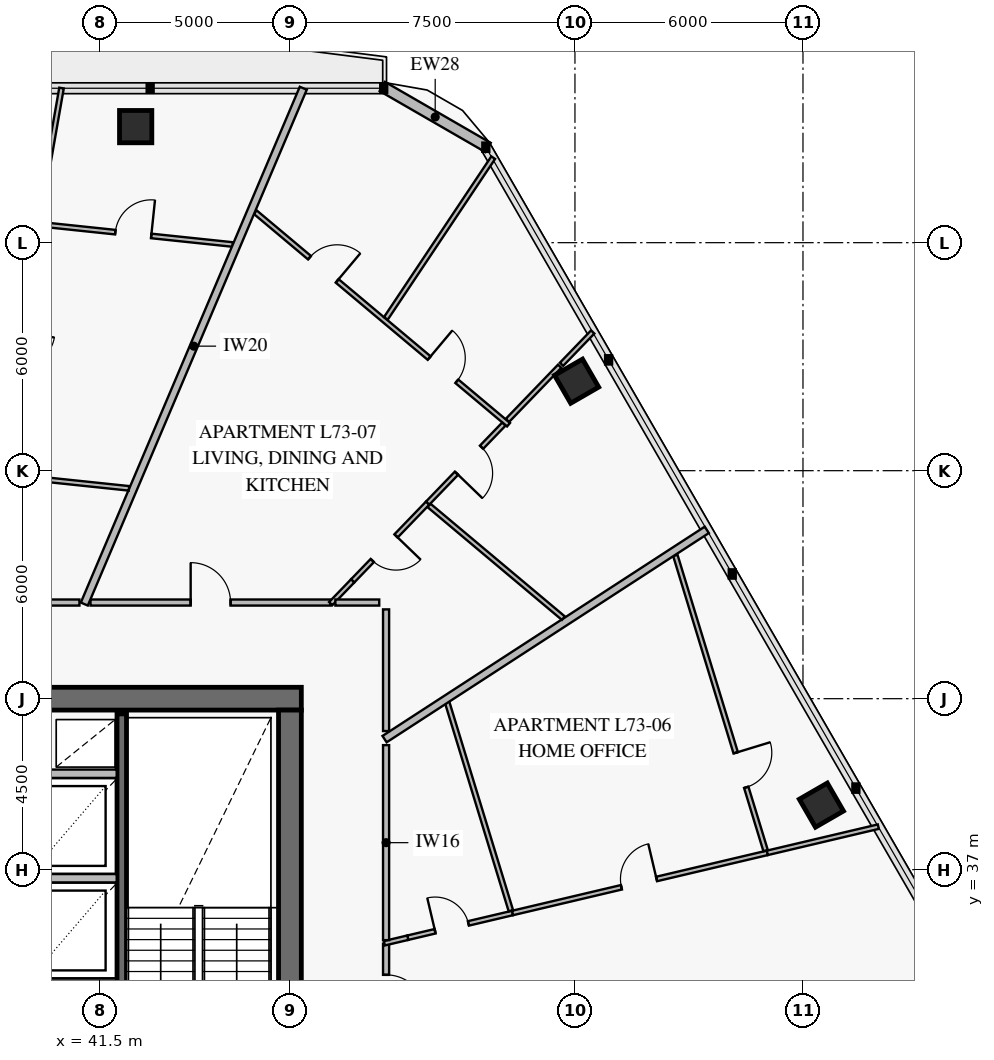
"""IFC4 building model, lengths in metres.
Left out: names, types, materials, properties, quantities, classifications, styles, units other than length and angle.
Written with IfcOpenShell. Run it as: python <this file> out.ifc"""

import sys

from ifc_helpers import new_model, si_unit, direction, frame, frame_2d, origin, origin_2d, place, context, subcontext, project, spatial, rectangle, extrude, element, fill, save


model = new_model("IFC4")
c1 = context("Model", 3, precision=1e-05, world=origin(), true_north=direction((0.0, 1.0)))
c2 = subcontext(c1, "Body", "Model", "MODEL_VIEW")
j1 = project(units=[si_unit("LENGTHUNIT", "METRE"), si_unit("PLANEANGLEUNIT", "RADIAN")], contexts=[c1])
p1 = place(None, origin())
s1 = spatial("IfcSite", under=j1, at=p1, CompositionType="ELEMENT")
p2 = place(p1, origin())
s2 = spatial("IfcBuilding", under=s1, at=p2, CompositionType="ELEMENT")
p3 = place(p2, frame((0.0, 0.0, 288.2)))
s3 = spatial("IfcBuildingStorey", under=s2, at=p3, CompositionType="ELEMENT", Elevation=288.2)
p4 = place(p3, frame((46.8, 41.5, 0.0), z_axis=(0.0, 0.0, 1.0), x_axis=(-1.0, 0.0, 0.0)))
e1 = element("IfcWall", 1, at=p4, inside=s3, PredefinedType="SHEAR", context=c2, shape_type="SweptSolid", body=[
    extrude(rectangle(XDim=7.85, YDim=0.6, at=frame_2d((3.925, 0.0))), origin(), (0.0, 0.0, 1.0), 3.8),
])
p5 = place(p3, frame((46.5, 22.8, 0.0), z_axis=(0.0, 0.0, 1.0), x_axis=(0.0, 1.0, 0.0)))
e2 = element("IfcWall", 2, at=p5, inside=s3, PredefinedType="SHEAR", context=c2, shape_type="SweptSolid", body=[
    extrude(rectangle(XDim=18.4, YDim=0.6, at=frame_2d((9.2, 0.0))), origin(), (0.0, 0.0, 1.0), 3.8),
])
p6 = place(p5, frame((8.95, 0.0, 0.0)))
e3 = element("IfcOpeningElement", 3, at=p6, cuts=e2, PredefinedType="OPENING", context=c2, shape_type="SweptSolid", body=[
    extrude(rectangle(XDim=1.1, YDim=2.15, at=frame_2d((0.55, 1.075))), frame((0.0, 0.312, 0.0), z_axis=(0.0, -1.0, 0.0), x_axis=(1.0, 0.0, 0.0)), (0.0, 0.0, 1.0), 0.624),
])
for number, where, z_axis, x_axis in (
    (4, (60.485, 38.699, 0.0), (0.0, 0.0, 1.0), (-0.5, 0.866, 0.0)),
    (5, (54.044, 49.855, 0.0), (0.0, 0.0, 1.0), (-0.5, 0.866, 0.0)),
    (6, (42.441, 56.554, 0.0), (0.0, 0.0, 1.0), (-1.0, 0.0, 0.0)),
):
    element("IfcColumn", number, at=place(p3, frame(where, z_axis=z_axis, x_axis=x_axis)), inside=s3, PredefinedType="COLUMN", context=c2, shape_type="SweptSolid", body=[
        extrude(rectangle(XDim=0.85, YDim=0.85, at=origin_2d()), origin(), (0.0, 0.0, 1.0), 3.55),
    ])
p7 = place(p3, frame((48.93, 57.611, 0.0), z_axis=(0.0, 0.0, 1.0), x_axis=(0.866028773314, -0.499994163758, 0.0)))
e7 = element("IfcWall", 7, at=p7, inside=s3, PredefinedType="SOLIDWALL", context=c2, shape_type="SweptSolid", body=[
    extrude(rectangle(XDim=3.215, YDim=0.28, at=frame_2d((1.607, 0.0))), origin(), (0.0, 0.0, 1.0), 3.55),
])
p8 = place(p3, frame((42.075, 31.4, 0.0), z_axis=(0.0, 0.0, 1.0), x_axis=(0.0, 1.0, 0.0)))
e8 = element("IfcWall", 8, at=p8, inside=s3, PredefinedType="SOLIDWALL", context=c2, shape_type="SweptSolid", body=[
    extrude(rectangle(XDim=9.7, YDim=0.25, at=frame_2d((4.85, 0.0))), origin(), (0.0, 0.0, 1.0), 3.8),
])
p9 = place(p3, frame((49.6, 35.21, 0.0), z_axis=(0.0, 0.0, 1.0), x_axis=(0.973261007636, 0.229702004812, 0.0)))
e9 = element("IfcWall", 9, at=p9, inside=s3, PredefinedType="PARTITIONING", context=c2, shape_type="SweptSolid", body=[
    extrude(rectangle(XDim=2.833, YDim=0.12, at=frame_2d((1.417, 0.0))), origin(), (0.0, 0.0, 1.0), 3.55),
])
p10 = place(p9, frame((0.74, 0.0, 0.0)))
e10 = element("IfcOpeningElement", 10, at=p10, cuts=e9, PredefinedType="OPENING", context=c2, shape_type="SweptSolid", body=[
    extrude(rectangle(XDim=0.9, YDim=2.1, at=frame_2d((0.45, 1.05))), frame((0.0, 0.072, 0.0), z_axis=(0.0, -1.0, 0.0), x_axis=(1.0, 0.0, 0.0)), (0.0, 0.0, 1.0), 0.144),
])
p11 = place(p3, frame((52.358, 35.861, 0.0), z_axis=(0.0, 0.0, 1.0), x_axis=(0.973258867779, 0.229711071324, 0.0)))
e11 = element("IfcWall", 11, at=p11, inside=s3, PredefinedType="PARTITIONING", context=c2, shape_type="SweptSolid", body=[
    extrude(rectangle(XDim=6.887, YDim=0.12, at=frame_2d((3.443, 0.0))), origin(), (0.0, 0.0, 1.0), 3.55),
])
p12 = place(p11, frame((2.944, 0.0, 0.0)))
e12 = element("IfcOpeningElement", 12, at=p12, cuts=e11, PredefinedType="OPENING", context=c2, shape_type="SweptSolid", body=[
    extrude(rectangle(XDim=0.95, YDim=2.1, at=frame_2d((0.475, 1.05))), frame((0.0, 0.072, 0.0), z_axis=(0.0, -1.0, 0.0), x_axis=(1.0, 0.0, 0.0)), (0.0, 0.0, 1.0), 0.144),
])
p13 = place(p3, frame((59.017, 37.502, 0.0), z_axis=(0.0, 0.0, 1.0), x_axis=(-0.292365927027, 0.956306522363, 0.0)))
e13 = element("IfcWall", 13, at=p13, inside=s3, PredefinedType="PARTITIONING", context=c2, shape_type="SweptSolid", body=[
    extrude(rectangle(XDim=8.122, YDim=0.12, at=frame_2d((4.061, 0.0))), origin(), (0.0, 0.0, 1.0), 2.93),
])
p14 = place(p13, frame((1.742, 0.0, 0.0)))
e14 = element("IfcOpeningElement", 14, at=p14, cuts=e13, PredefinedType="OPENING", context=c2, shape_type="SweptSolid", body=[
    extrude(rectangle(XDim=0.95, YDim=2.1, at=frame_2d((0.475, 1.05))), frame((0.0, 0.072, 0.0), z_axis=(0.0, -1.0, 0.0), x_axis=(1.0, 0.0, 0.0)), (0.0, 0.0, 1.0), 0.144),
])
p15 = place(p3, frame((49.03, 32.361, 0.0), z_axis=(0.0, 0.0, 1.0), x_axis=(0.0, 1.0, 0.0)))
e15 = element("IfcWall", 15, at=p15, inside=s3, PredefinedType="PARTITIONING", context=c2, shape_type="SweptSolid", body=[
    extrude(rectangle(XDim=2.694, YDim=0.16, at=frame_2d((1.347, 0.0))), origin(), (0.0, 0.0, 1.0), 3.55),
])
p16 = place(p15, frame((0.822, 0.0, 0.0)))
e16 = element("IfcOpeningElement", 16, at=p16, cuts=e15, PredefinedType="OPENING", context=c2, shape_type="SweptSolid", body=[
    extrude(rectangle(XDim=1.05, YDim=2.15, at=frame_2d((0.525, 1.075))), frame((0.0, 0.092, 0.0), z_axis=(0.0, -1.0, 0.0), x_axis=(1.0, 0.0, 0.0)), (0.0, 0.0, 1.0), 0.184),
])
p17 = place(p3, frame((52.253, 48.71, 0.0), z_axis=(0.0, 0.0, 1.0), x_axis=(-0.766038651281, 0.642794512067, 0.0)))
e17 = element("IfcWall", 17, at=p17, inside=s3, PredefinedType="PARTITIONING", context=c2, shape_type="SweptSolid", body=[
    extrude(rectangle(XDim=8.7, YDim=0.12, at=frame_2d((4.35, 0.0))), origin(), (0.0, 0.0, 1.0), 3.55),
])
p18 = place(p17, frame((1.778, 0.0, 0.0)))
e18 = element("IfcOpeningElement", 18, at=p18, cuts=e17, PredefinedType="OPENING", context=c2, shape_type="SweptSolid", body=[
    extrude(rectangle(XDim=0.95, YDim=2.1, at=frame_2d((0.475, 1.05))), frame((0.0, 0.072, 0.0), z_axis=(0.0, -1.0, 0.0), x_axis=(1.0, 0.0, 0.0)), (0.0, 0.0, 1.0), 0.144),
])
p19 = place(p17, frame((5.887, 0.0, 0.0)))
e19 = element("IfcOpeningElement", 19, at=p19, cuts=e17, PredefinedType="OPENING", context=c2, shape_type="SweptSolid", body=[
    extrude(rectangle(XDim=0.95, YDim=2.1, at=frame_2d((0.475, 1.05))), frame((0.0, 0.072, 0.0), z_axis=(0.0, -1.0, 0.0), x_axis=(1.0, 0.0, 0.0)), (0.0, 0.0, 1.0), 0.144),
])
p20 = place(p3, frame((48.151, 44.6, 0.0), z_axis=(0.0, 0.0, 1.0), x_axis=(0.694200700665, 0.719781485727, 0.0)))
e20 = element("IfcWall", 20, at=p20, inside=s3, PredefinedType="PARTITIONING", context=c2, shape_type="SweptSolid", body=[
    extrude(rectangle(XDim=2.844, YDim=0.12, at=frame_2d((1.422, 0.0))), origin(), (0.0, 0.0, 1.0), 3.55),
])
p21 = place(p20, frame((0.745, 0.0, 0.0)))
e21 = element("IfcOpeningElement", 21, at=p21, cuts=e20, PredefinedType="OPENING", context=c2, shape_type="SweptSolid", body=[
    extrude(rectangle(XDim=0.9, YDim=2.1, at=frame_2d((0.45, 1.05))), frame((0.0, 0.072, 0.0), z_axis=(0.0, -1.0, 0.0), x_axis=(1.0, 0.0, 0.0)), (0.0, 0.0, 1.0), 0.144),
])
p22 = place(p3, frame((50.125, 46.647, 0.0), z_axis=(0.0, 0.0, 1.0), x_axis=(0.6941778281, 0.719803544708, 0.0)))
e22 = element("IfcWall", 22, at=p22, inside=s3, PredefinedType="PARTITIONING", context=c2, shape_type="SweptSolid", body=[
    extrude(rectangle(XDim=2.887, YDim=0.12, at=frame_2d((1.443, 0.0))), origin(), (0.0, 0.0, 1.0), 3.55),
])
p23 = place(p22, frame((1.092, 0.0, 0.0)))
e23 = element("IfcOpeningElement", 23, at=p23, cuts=e22, PredefinedType="OPENING", context=c2, shape_type="SweptSolid", body=[
    extrude(rectangle(XDim=0.95, YDim=2.1, at=frame_2d((0.475, 1.05))), frame((0.0, 0.072, 0.0), z_axis=(0.0, -1.0, 0.0), x_axis=(1.0, 0.0, 0.0)), (0.0, 0.0, 1.0), 0.144),
])
p24 = place(p3, frame((52.223, 48.823, 0.0), z_axis=(0.0, 0.0, 1.0), x_axis=(0.694112766322, 0.719866284547, 0.0)))
e24 = element("IfcWall", 24, at=p24, inside=s3, PredefinedType="PARTITIONING", context=c2, shape_type="SweptSolid", body=[
    extrude(rectangle(XDim=1.981, YDim=0.12, at=frame_2d((0.991, 0.0))), origin(), (0.0, 0.0, 1.0), 2.93),
])
p25 = place(p3, frame((47.573, 44.03, 0.0), z_axis=(0.0, 0.0, 1.0), x_axis=(-1.0, 0.0, 0.0)))
e25 = element("IfcWall", 25, at=p25, inside=s3, PredefinedType="PARTITIONING", context=c2, shape_type="SweptSolid", body=[
    extrude(rectangle(XDim=6.321, YDim=0.16, at=frame_2d((3.16, 0.0))), origin(), (0.0, 0.0, 1.0), 3.55),
])
p26 = place(p25, frame((2.635, 0.0, 0.0)))
e26 = element("IfcOpeningElement", 26, at=p26, cuts=e25, PredefinedType="OPENING", context=c2, shape_type="SweptSolid", body=[
    extrude(rectangle(XDim=1.05, YDim=2.15, at=frame_2d((0.525, 1.075))), frame((0.0, 0.092, 0.0), z_axis=(0.0, -1.0, 0.0), x_axis=(1.0, 0.0, 0.0)), (0.0, 0.0, 1.0), 0.184),
])
p27 = place(p3, frame((44.994, 53.452, 0.0), z_axis=(0.0, 0.0, 1.0), x_axis=(-0.994522778287, 0.104520062511, 0.0)))
e27 = element("IfcWall", 27, at=p27, inside=s3, PredefinedType="PARTITIONING", context=c2, shape_type="SweptSolid", body=[
    extrude(rectangle(XDim=5.092, YDim=0.12, at=frame_2d((2.546, 0.0))), origin(), (0.0, 0.0, 1.0), 2.95),
])
p28 = place(p27, frame((2.155, 0.0, 0.0)))
e28 = element("IfcOpeningElement", 28, at=p28, cuts=e27, PredefinedType="OPENING", context=c2, shape_type="SweptSolid", body=[
    extrude(rectangle(XDim=0.95, YDim=2.1, at=frame_2d((0.475, 1.05))), frame((0.0, 0.072, 0.0), z_axis=(0.0, -1.0, 0.0), x_axis=(1.0, 0.0, 0.0)), (0.0, 0.0, 1.0), 0.144),
])
for number, where, z_axis, x_axis in (
    (29, (39.558, 34.025, 0.0), (0.0, 0.0, 1.0), (1.0, 0.0, 0.0)),
    (30, (39.558, 36.775, 0.0), (0.0, 0.0, 1.0), (1.0, 0.0, 0.0)),
    (31, (39.558, 39.525, 0.0), (0.0, 0.0, 1.0), (1.0, 0.0, 0.0)),
):
    element("IfcWall", number, at=place(p3, frame(where, z_axis=z_axis, x_axis=x_axis)), inside=s3, PredefinedType="PARTITIONING", context=c2, shape_type="SweptSolid", body=[
        extrude(rectangle(XDim=2.384, YDim=0.22, at=frame_2d((1.192, 0.0))), origin(), (0.0, 0.0, 1.0), 3.55),
    ])
p29 = place(p3, frame((48.986, 35.065, 0.0), z_axis=(0.0, 0.0, 1.0), x_axis=(0.973264818569, 0.229685857064, 0.0)))
e32 = element("IfcWall", 32, at=p29, inside=s3, PredefinedType="PARTITIONING", context=c2, shape_type="SweptSolid", body=[
    extrude(rectangle(XDim=0.631, YDim=0.12, at=frame_2d((0.316, 0.0))), origin(), (0.0, 0.0, 1.0), 3.55),
])
p30 = place(p3, frame((59.061, 37.443, 0.0), z_axis=(0.0, 0.0, 1.0), x_axis=(0.97326763554, 0.229673920178, 0.0)))
e33 = element("IfcWall", 33, at=p30, inside=s3, PredefinedType="PARTITIONING", context=c2, shape_type="SweptSolid", body=[
    extrude(rectangle(XDim=3.002, YDim=0.12, at=frame_2d((1.501, 0.0))), origin(), (0.0, 0.0, 1.0), 2.93),
])
p31 = place(p3, frame((52.314, 35.92, 0.0), z_axis=(0.0, 0.0, 1.0), x_axis=(-0.292348629737, 0.95631181039, 0.0)))
e34 = element("IfcWall", 34, at=p31, inside=s3, PredefinedType="PARTITIONING", context=c2, shape_type="SweptSolid", body=[
    extrude(rectangle(XDim=5.769, YDim=0.12, at=frame_2d((2.884, 0.0))), origin(), (0.0, 0.0, 1.0), 2.95),
])
p32 = place(p3, frame((48.99, 40.436, 0.0), z_axis=(0.0, 0.0, 1.0), x_axis=(0.838669748525, 0.54464029681, 0.0)))
e35 = element("IfcWall", 35, at=p32, inside=s3, PredefinedType="PARTITIONING", context=c2, shape_type="SweptSolid", body=[
    extrude(rectangle(XDim=10.11, YDim=0.2, at=frame_2d((5.055, 0.0))), origin(), (0.0, 0.0, 1.0), 2.93),
])
p33 = place(p3, frame((49.025, 51.507, 0.0), z_axis=(0.0, 0.0, 1.0), x_axis=(0.555254005254, 0.83168082198, 0.0)))
e36 = element("IfcWall", 36, at=p33, inside=s3, PredefinedType="PARTITIONING", context=c2, shape_type="SweptSolid", body=[
    extrude(rectangle(XDim=5.085, YDim=0.12, at=frame_2d((2.543, 0.0))), origin(), (0.0, 0.0, 1.0), 2.93),
])
p34 = place(p3, frame((47.573, 44.001, 0.0), z_axis=(0.0, 0.0, 1.0), x_axis=(0.69407582512, 0.719901902334, 0.0)))
e37 = element("IfcWall", 37, at=p34, inside=s3, PredefinedType="PARTITIONING", context=c2, shape_type="SweptSolid", body=[
    extrude(rectangle(XDim=0.832, YDim=0.12, at=frame_2d((0.416, 0.0))), origin(), (0.0, 0.0, 1.0), 3.55),
])
p35 = place(p3, frame((53.647, 50.3, 0.0), z_axis=(0.0, 0.0, 1.0), x_axis=(0.694170010819, 0.719811083604, 0.0)))
e38 = element("IfcWall", 38, at=p35, inside=s3, PredefinedType="PARTITIONING", context=c2, shape_type="SweptSolid", body=[
    extrude(rectangle(XDim=1.181, YDim=0.12, at=frame_2d((0.59, 0.0))), origin(), (0.0, 0.0, 1.0), 3.122),
])
p36 = place(p3, frame((53.694, 43.62, 0.0), z_axis=(0.0, 0.0, 1.0), x_axis=(-0.766035202898, 0.642798621593, 0.0)))
e39 = element("IfcWall", 39, at=p36, inside=s3, PredefinedType="PARTITIONING", context=c2, shape_type="SweptSolid", body=[
    extrude(rectangle(XDim=4.614, YDim=0.12, at=frame_2d((2.307, 0.0))), origin(), (0.0, 0.0, 1.0), 2.95),
])
p37 = place(p3, frame((41.09, 43.99, 0.0), z_axis=(0.0, 0.0, 1.0), x_axis=(0.390717789384, 0.920510515453, 0.0)))
e40 = element("IfcWall", 40, at=p37, inside=s3, PredefinedType="PARTITIONING", context=c2, shape_type="SweptSolid", body=[
    extrude(rectangle(XDim=14.746, YDim=0.2, at=frame_2d((7.373, 0.0))), origin(), (0.0, 0.0, 1.0), 2.93),
])
p38 = place(p3, frame((39.866, 54.016, 0.0), z_axis=(0.0, 0.0, 1.0), x_axis=(0.172931953875, 0.984933774083, 0.0)))
e41 = element("IfcWall", 41, at=p38, inside=s3, PredefinedType="PARTITIONING", context=c2, shape_type="SweptSolid", body=[
    extrude(rectangle(XDim=3.607, YDim=0.12, at=frame_2d((1.804, 0.0))), origin(), (0.0, 0.0, 1.0), 2.93),
])
p39 = place(p3, frame((42.265, 47.035, 0.0), z_axis=(0.0, 0.0, 1.0), x_axis=(-0.994521067177, 0.104536342679, 0.0)))
e42 = element("IfcWall", 42, at=p39, inside=s3, PredefinedType="PARTITIONING", context=c2, shape_type="SweptSolid", body=[
    extrude(rectangle(XDim=3.51, YDim=0.12, at=frame_2d((1.755, 0.0))), origin(), (0.0, 0.0, 1.0), 2.95),
])
p40 = place(p3, frame((49.03, 35.145, 0.0), z_axis=(0.0, 0.0, 1.0), x_axis=(0.0, 1.0, 0.0)))
e43 = element("IfcWall", 43, at=p40, inside=s3, PredefinedType="PARTITIONING", context=c2, shape_type="SweptSolid", body=[
    extrude(rectangle(XDim=5.132, YDim=0.16, at=frame_2d((2.566, 0.0))), origin(), (0.0, 0.0, 1.0), 2.95),
])
p41 = place(p3, frame((49.03, 40.648, 0.0), z_axis=(0.0, 0.0, 1.0), x_axis=(0.0, 1.0, 0.0)))
e44 = element("IfcWall", 44, at=p41, inside=s3, PredefinedType="PARTITIONING", context=c2, shape_type="SweptSolid", body=[
    extrude(rectangle(XDim=3.202, YDim=0.16, at=frame_2d((1.601, 0.0))), origin(), (0.0, 0.0, 1.0), 3.55),
])
p42 = place(p3, frame((48.85, 44.03, 0.0), z_axis=(0.0, 0.0, 1.0), x_axis=(-1.0, 0.0, 0.0)))
e45 = element("IfcWall", 45, at=p42, inside=s3, PredefinedType="PARTITIONING", context=c2, shape_type="SweptSolid", body=[
    extrude(rectangle(XDim=1.155, YDim=0.16, at=frame_2d((0.577, 0.0))), origin(), (0.0, 0.0, 1.0), 2.95),
])
p43 = place(p3, frame((40.961, 44.03, 0.0), z_axis=(0.0, 0.0, 1.0), x_axis=(-1.0, 0.0, 0.0)))
e46 = element("IfcWall", 46, at=p43, inside=s3, PredefinedType="PARTITIONING", context=c2, shape_type="SweptSolid", body=[
    extrude(rectangle(XDim=2.78, YDim=0.16, at=frame_2d((1.39, 0.0))), origin(), (0.0, 0.0, 1.0), 2.95),
])
p44 = place(p10, origin())
e47 = element("IfcDoor", 47, at=p44, inside=s3, OperationType="SINGLE_SWING_LEFT", PredefinedType="DOOR", context=c2, shape_type="SweptSolid", body=[
    extrude(rectangle(XDim=0.9, YDim=2.1, at=frame_2d((0.45, 1.05))), frame((0.0, 0.025, 0.0), z_axis=(0.0, -1.0, 0.0), x_axis=(1.0, 0.0, 0.0)), (0.0, 0.0, 1.0), 0.05),
])
fill(e10, e47)
p45 = place(p12, origin())
e48 = element("IfcDoor", 48, at=p45, inside=s3, OperationType="SINGLE_SWING_RIGHT", PredefinedType="DOOR", context=c2, shape_type="SweptSolid", body=[
    extrude(rectangle(XDim=0.95, YDim=2.1, at=frame_2d((0.475, 1.05))), frame((0.0, 0.025, 0.0), z_axis=(0.0, -1.0, 0.0), x_axis=(1.0, 0.0, 0.0)), (0.0, 0.0, 1.0), 0.05),
])
fill(e12, e48)
p46 = place(p14, frame((0.95, 0.0, 0.0), z_axis=(0.0, 0.0, 1.0), x_axis=(-1.0, 0.0, 0.0)))
e49 = element("IfcDoor", 49, at=p46, inside=s3, OperationType="SINGLE_SWING_LEFT", PredefinedType="DOOR", context=c2, shape_type="SweptSolid", body=[
    extrude(rectangle(XDim=0.95, YDim=2.1, at=frame_2d((0.475, 1.05))), frame((0.0, 0.025, 0.0), z_axis=(0.0, -1.0, 0.0), x_axis=(1.0, 0.0, 0.0)), (0.0, 0.0, 1.0), 0.05),
])
fill(e14, e49)
p47 = place(p16, frame((1.05, 0.0, 0.0), z_axis=(0.0, 0.0, 1.0), x_axis=(-1.0, 0.0, 0.0)))
e50 = element("IfcDoor", 50, at=p47, inside=s3, OperationType="SINGLE_SWING_RIGHT", PredefinedType="DOOR", context=c2, shape_type="SweptSolid", body=[
    extrude(rectangle(XDim=1.05, YDim=2.15, at=frame_2d((0.525, 1.075))), frame((0.0, 0.025, 0.0), z_axis=(0.0, -1.0, 0.0), x_axis=(1.0, 0.0, 0.0)), (0.0, 0.0, 1.0), 0.05),
])
fill(e16, e50)
p48 = place(p18, frame((0.95, 0.0, 0.0), z_axis=(0.0, 0.0, 1.0), x_axis=(-1.0, 0.0, 0.0)))
e51 = element("IfcDoor", 51, at=p48, inside=s3, OperationType="SINGLE_SWING_LEFT", PredefinedType="DOOR", context=c2, shape_type="SweptSolid", body=[
    extrude(rectangle(XDim=0.95, YDim=2.1, at=frame_2d((0.475, 1.05))), frame((0.0, 0.025, 0.0), z_axis=(0.0, -1.0, 0.0), x_axis=(1.0, 0.0, 0.0)), (0.0, 0.0, 1.0), 0.05),
])
fill(e18, e51)
p49 = place(p19, frame((0.95, 0.0, 0.0), z_axis=(0.0, 0.0, 1.0), x_axis=(-1.0, 0.0, 0.0)))
e52 = element("IfcDoor", 52, at=p49, inside=s3, OperationType="SINGLE_SWING_RIGHT", PredefinedType="DOOR", context=c2, shape_type="SweptSolid", body=[
    extrude(rectangle(XDim=0.95, YDim=2.1, at=frame_2d((0.475, 1.05))), frame((0.0, 0.025, 0.0), z_axis=(0.0, -1.0, 0.0), x_axis=(1.0, 0.0, 0.0)), (0.0, 0.0, 1.0), 0.05),
])
fill(e19, e52)
p50 = place(p21, frame((0.9, 0.0, 0.0), z_axis=(0.0, 0.0, 1.0), x_axis=(-1.0, 0.0, 0.0)))
e53 = element("IfcDoor", 53, at=p50, inside=s3, OperationType="SINGLE_SWING_LEFT", PredefinedType="DOOR", context=c2, shape_type="SweptSolid", body=[
    extrude(rectangle(XDim=0.9, YDim=2.1, at=frame_2d((0.45, 1.05))), frame((0.0, 0.025, 0.0), z_axis=(0.0, -1.0, 0.0), x_axis=(1.0, 0.0, 0.0)), (0.0, 0.0, 1.0), 0.05),
])
fill(e21, e53)
p51 = place(p23, frame((0.95, 0.0, 0.0), z_axis=(0.0, 0.0, 1.0), x_axis=(-1.0, 0.0, 0.0)))
e54 = element("IfcDoor", 54, at=p51, inside=s3, OperationType="SINGLE_SWING_RIGHT", PredefinedType="DOOR", context=c2, shape_type="SweptSolid", body=[
    extrude(rectangle(XDim=0.95, YDim=2.1, at=frame_2d((0.475, 1.05))), frame((0.0, 0.025, 0.0), z_axis=(0.0, -1.0, 0.0), x_axis=(1.0, 0.0, 0.0)), (0.0, 0.0, 1.0), 0.05),
])
fill(e23, e54)
p52 = place(p26, frame((1.05, 0.0, 0.0), z_axis=(0.0, 0.0, 1.0), x_axis=(-1.0, 0.0, 0.0)))
e55 = element("IfcDoor", 55, at=p52, inside=s3, OperationType="SINGLE_SWING_LEFT", PredefinedType="DOOR", context=c2, shape_type="SweptSolid", body=[
    extrude(rectangle(XDim=1.05, YDim=2.15, at=frame_2d((0.525, 1.075))), frame((0.0, 0.025, 0.0), z_axis=(0.0, -1.0, 0.0), x_axis=(1.0, 0.0, 0.0)), (0.0, 0.0, 1.0), 0.05),
])
fill(e26, e55)
p53 = place(p28, frame((0.95, 0.0, 0.0), z_axis=(0.0, 0.0, 1.0), x_axis=(-1.0, 0.0, 0.0)))
e56 = element("IfcDoor", 56, at=p53, inside=s3, OperationType="SINGLE_SWING_RIGHT", PredefinedType="DOOR", context=c2, shape_type="SweptSolid", body=[
    extrude(rectangle(XDim=0.95, YDim=2.1, at=frame_2d((0.475, 1.05))), frame((0.0, 0.025, 0.0), z_axis=(0.0, -1.0, 0.0), x_axis=(1.0, 0.0, 0.0)), (0.0, 0.0, 1.0), 0.05),
])
fill(e28, e56)
save(model, sys.argv[1])
